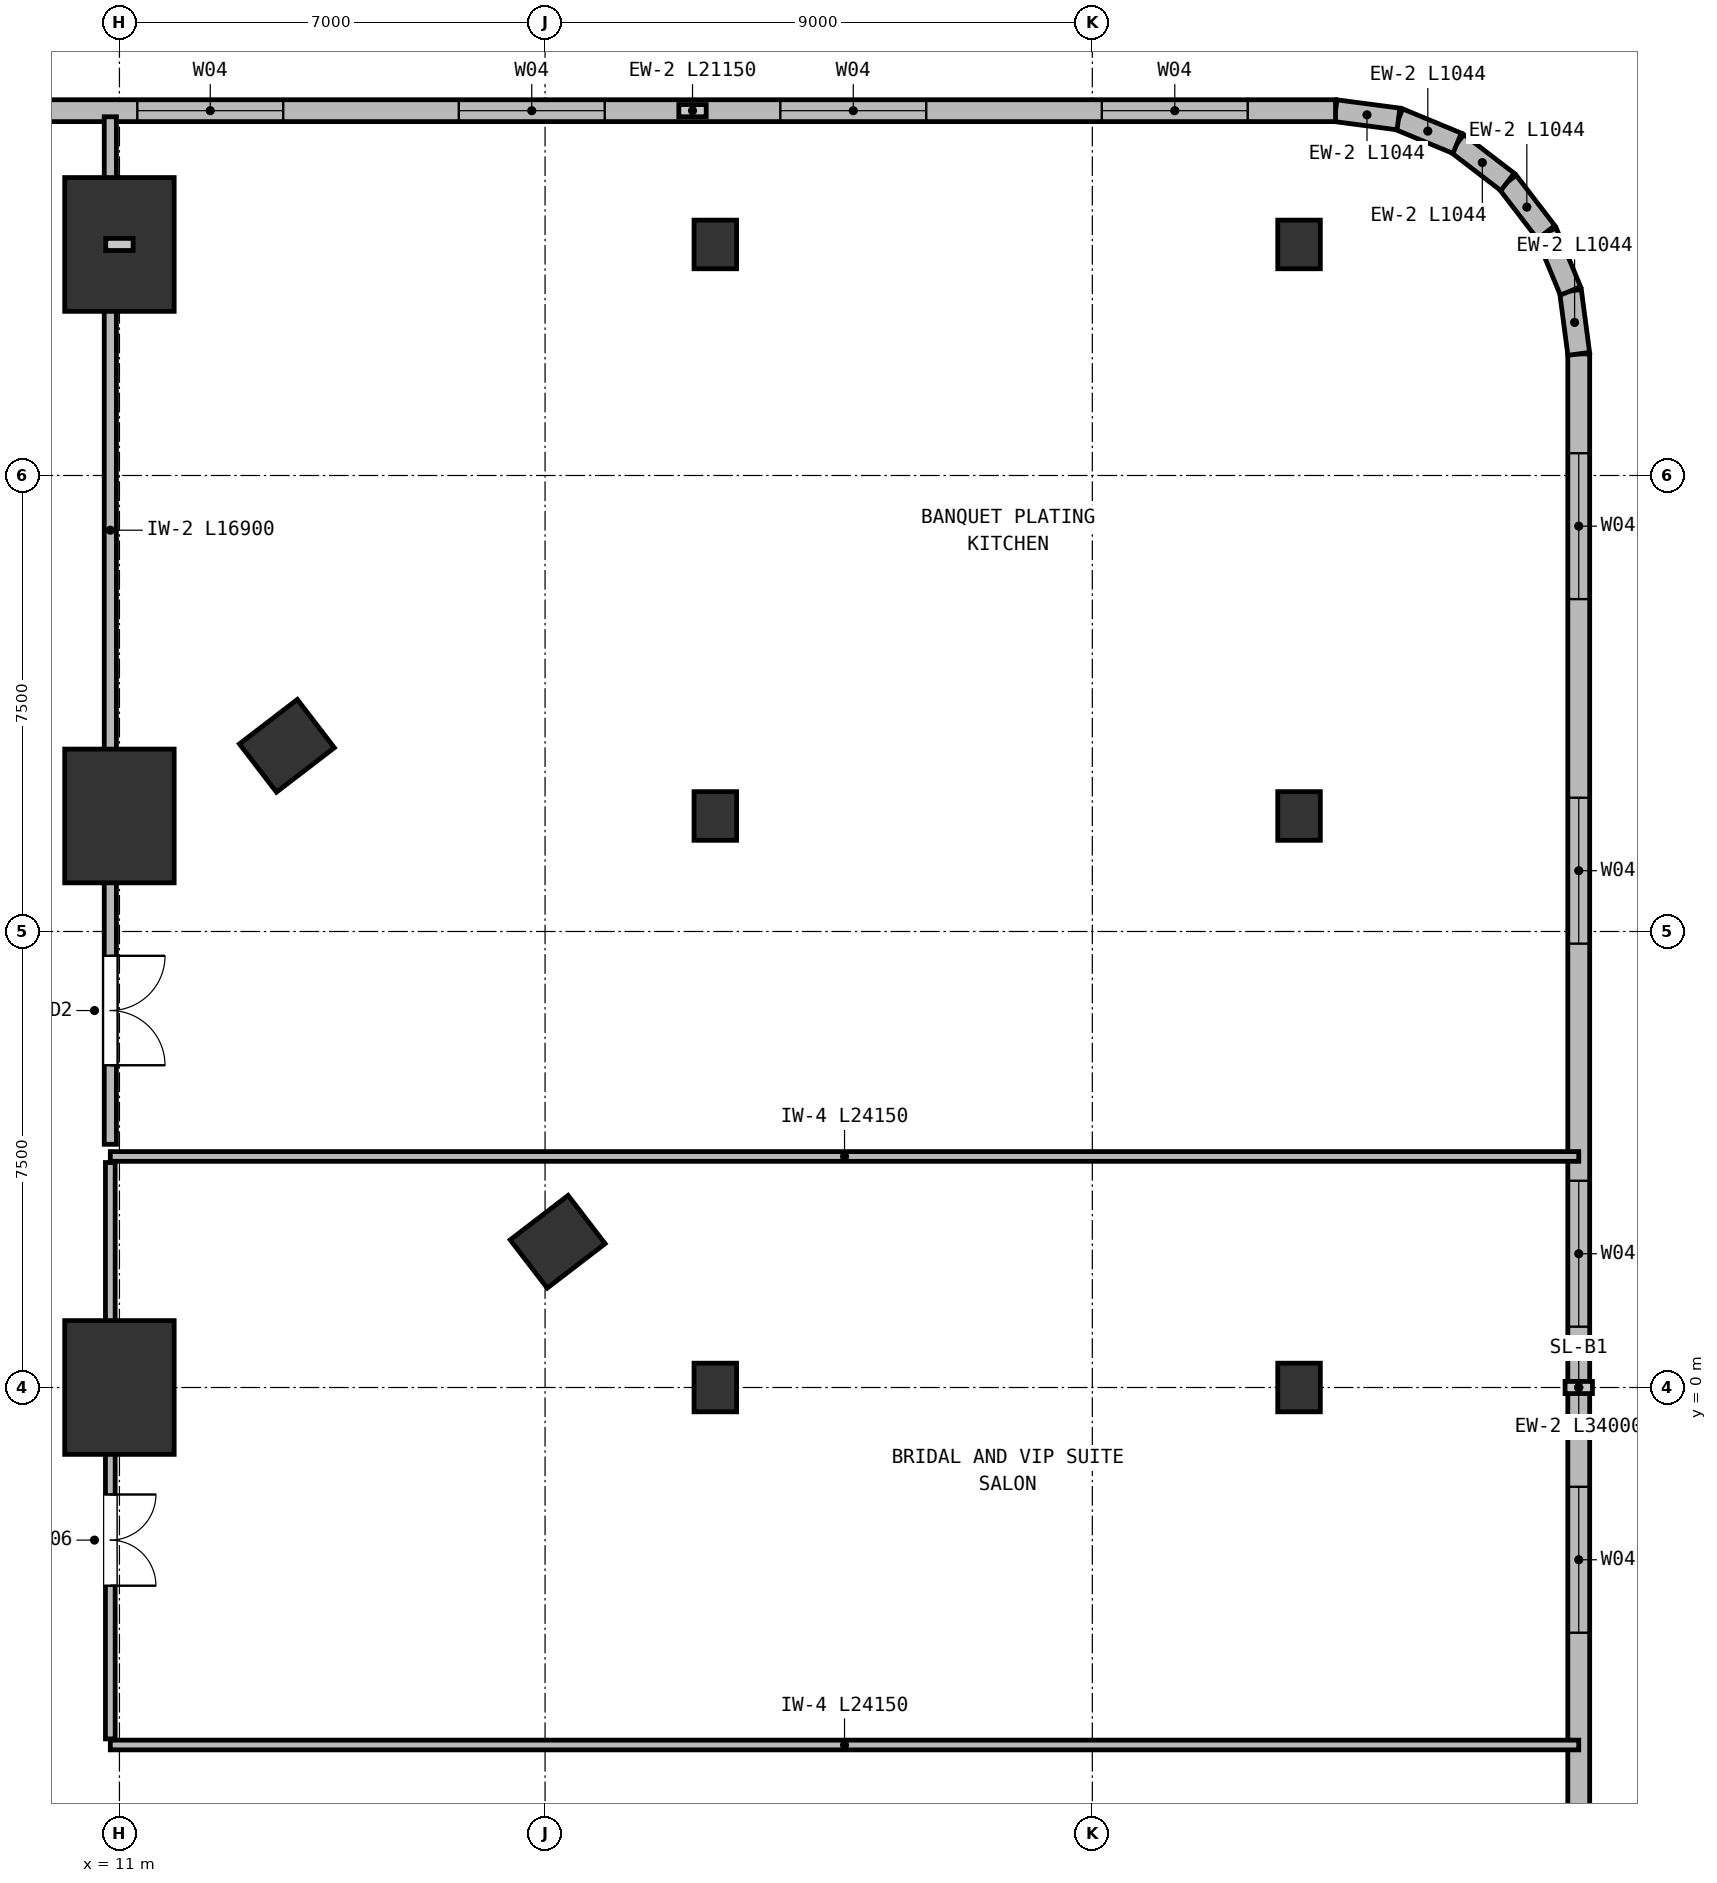
"""IFC4 building model, lengths in metres.
Left out: names, types, materials, properties, quantities, classifications, styles, units other than length and angle.
Written with IfcOpenShell. Run it as: python <this file> out.ifc"""

import sys

from ifc_helpers import new_model, si_unit, direction, frame, frame_2d, origin, origin_2d, place, context, subcontext, project, spatial, rectangle, extrude, element, fill, save


model = new_model("IFC4")
c1 = context("Model", 3, precision=1e-05, world=origin(), true_north=direction((0.0, 1.0)))
c2 = subcontext(c1, "Body", "Model", "MODEL_VIEW")
j1 = project(units=[si_unit("LENGTHUNIT", "METRE"), si_unit("PLANEANGLEUNIT", "RADIAN")], contexts=[c1])
p1 = place(None, origin())
s1 = spatial("IfcSite", under=j1, at=p1, CompositionType="ELEMENT")
p2 = place(p1, origin())
s2 = spatial("IfcBuilding", under=s1, at=p2, CompositionType="ELEMENT")
p3 = place(p2, frame((0.0, 0.0, 16.0)))
s3 = spatial("IfcBuildingStorey", under=s2, at=p3, CompositionType="ELEMENT", Elevation=16.0)
for number, where, z_axis, x_axis in (
    (1, (18.207, 2.397, 0.0), (0.0, 0.0, 1.0), (-0.609, 0.793, 0.0)),
    (2, (13.754, 10.554, 0.0), (0.0, 0.0, 1.0), (-0.609, 0.793, 0.0)),
):
    element("IfcColumn", number, at=place(p3, frame(where, z_axis=z_axis, x_axis=x_axis)), inside=s3, PredefinedType="COLUMN", context=c2, shape_type="SweptSolid", body=[
        extrude(rectangle(XDim=1.0, YDim=1.2, at=origin_2d()), origin(), (0.0, 0.0, 1.0), 5.5),
    ])
for number, where, z_axis, x_axis in (
    (3, (11.0, 0.0, 0.0), (0.0, 0.0, 1.0), (1.0, 0.0, 0.0)),
    (4, (11.0, 9.4, 0.0), (0.0, 0.0, 1.0), (1.0, 0.0, 0.0)),
    (5, (11.0, 18.8, 0.0), (0.0, 0.0, 1.0), (1.0, 0.0, 0.0)),
):
    element("IfcColumn", number, at=place(p3, frame(where, z_axis=z_axis, x_axis=x_axis)), inside=s3, PredefinedType="COLUMN", context=c2, shape_type="SweptSolid", body=[
        extrude(rectangle(XDim=1.8, YDim=2.2, at=origin_2d()), origin(), (0.0, 0.0, 1.0), 5.5),
    ])
for number, where, z_axis, x_axis in (
    (6, (20.8, 0.0, 0.0), (0.0, 0.0, 1.0), (1.0, 0.0, 0.0)),
    (7, (20.8, 9.4, 0.0), (0.0, 0.0, 1.0), (1.0, 0.0, 0.0)),
    (8, (20.8, 18.8, 0.0), (0.0, 0.0, 1.0), (1.0, 0.0, 0.0)),
    (9, (30.4, 0.0, 0.0), (0.0, 0.0, 1.0), (1.0, 0.0, 0.0)),
    (10, (30.4, 9.4, 0.0), (0.0, 0.0, 1.0), (1.0, 0.0, 0.0)),
    (11, (30.4, 18.8, 0.0), (0.0, 0.0, 1.0), (1.0, 0.0, 0.0)),
):
    element("IfcColumn", number, at=place(p3, frame(where, z_axis=z_axis, x_axis=x_axis)), inside=s3, PredefinedType="COLUMN", context=c2, shape_type="SweptSolid", body=[
        extrude(rectangle(XDim=0.7, YDim=0.8, at=origin_2d()), origin(), (0.0, 0.0, 1.0), 5.5),
    ])
p4 = place(p3, frame((35.0, 17.0, 0.0), z_axis=(0.0, 0.0, 1.0), x_axis=(0.0, -1.0, 0.0)))
e12 = element("IfcWall", 12, at=p4, inside=s3, PredefinedType="SOLIDWALL", context=c2, shape_type="SweptSolid", body=[
    extrude(rectangle(XDim=34.0, YDim=0.36, at=frame_2d((17.0, 0.0))), origin(), (0.0, 0.0, 1.0), 5.22),
])
p5 = place(p4, frame((1.633, 0.0, 0.95)))
e13 = element("IfcOpeningElement", 13, at=p5, cuts=e12, PredefinedType="OPENING", context=c2, shape_type="SweptSolid", body=[
    extrude(rectangle(XDim=2.4, YDim=2.6, at=frame_2d((1.2, 1.3))), frame((0.0, 0.19, 0.0), z_axis=(0.0, -1.0, 0.0), x_axis=(1.0, 0.0, 0.0)), (0.0, 0.0, 1.0), 0.38),
])
p6 = place(p4, frame((7.3, 0.0, 0.95)))
e14 = element("IfcOpeningElement", 14, at=p6, cuts=e12, PredefinedType="OPENING", context=c2, shape_type="SweptSolid", body=[
    extrude(rectangle(XDim=2.4, YDim=2.6, at=frame_2d((1.2, 1.3))), frame((0.0, 0.19, 0.0), z_axis=(0.0, -1.0, 0.0), x_axis=(1.0, 0.0, 0.0)), (0.0, 0.0, 1.0), 0.38),
])
p7 = place(p4, frame((13.6, 0.0, 0.95)))
e15 = element("IfcOpeningElement", 15, at=p7, cuts=e12, PredefinedType="OPENING", context=c2, shape_type="SweptSolid", body=[
    extrude(rectangle(XDim=2.4, YDim=2.6, at=frame_2d((1.2, 1.3))), frame((0.0, 0.19, 0.0), z_axis=(0.0, -1.0, 0.0), x_axis=(1.0, 0.0, 0.0)), (0.0, 0.0, 1.0), 0.38),
])
p8 = place(p4, frame((18.633, 0.0, 0.95)))
e16 = element("IfcOpeningElement", 16, at=p8, cuts=e12, PredefinedType="OPENING", context=c2, shape_type="SweptSolid", body=[
    extrude(rectangle(XDim=2.4, YDim=2.6, at=frame_2d((1.2, 1.3))), frame((0.0, 0.19, 0.0), z_axis=(0.0, -1.0, 0.0), x_axis=(1.0, 0.0, 0.0)), (0.0, 0.0, 1.0), 0.38),
])
p9 = place(p4, frame((24.3, 0.0, 0.95)))
e17 = element("IfcOpeningElement", 17, at=p9, cuts=e12, PredefinedType="OPENING", context=c2, shape_type="SweptSolid", body=[
    extrude(rectangle(XDim=2.4, YDim=2.6, at=frame_2d((1.2, 1.3))), frame((0.0, 0.19, 0.0), z_axis=(0.0, -1.0, 0.0), x_axis=(1.0, 0.0, 0.0)), (0.0, 0.0, 1.0), 0.38),
])
p10 = place(p4, frame((29.967, 0.0, 0.95)))
e18 = element("IfcOpeningElement", 18, at=p10, cuts=e12, PredefinedType="OPENING", context=c2, shape_type="SweptSolid", body=[
    extrude(rectangle(XDim=2.4, YDim=2.6, at=frame_2d((1.2, 1.3))), frame((0.0, 0.19, 0.0), z_axis=(0.0, -1.0, 0.0), x_axis=(1.0, 0.0, 0.0)), (0.0, 0.0, 1.0), 0.38),
])
p11 = place(p3, frame((34.864, 18.035, 0.0), z_axis=(0.0, 0.0, 1.0), x_axis=(0.130448465198, -0.991455091231, 0.0)))
e19 = element("IfcWall", 19, at=p11, inside=s3, PredefinedType="SOLIDWALL", context=c2, shape_type="SweptSolid", body=[
    extrude(rectangle(XDim=1.044, YDim=0.36, at=frame_2d((0.522, 0.0))), origin(), (0.0, 0.0, 1.0), 5.22),
])
for number, where, z_axis, x_axis in (
    (20, (34.464, 19.0, 0.0), (0.0, 0.0, 1.0), (0.383, -0.924, 0.0)),
    (21, (33.828, 19.828, 0.0), (0.0, 0.0, 1.0), (0.609, -0.793, 0.0)),
    (22, (33.0, 20.464, 0.0), (0.0, 0.0, 1.0), (0.793, -0.609, 0.0)),
    (23, (32.035, 20.864, 0.0), (0.0, 0.0, 1.0), (0.924, -0.383, 0.0)),
):
    element("IfcWall", number, at=place(p3, frame(where, z_axis=z_axis, x_axis=x_axis)), inside=s3, PredefinedType="SOLIDWALL", context=c2, shape_type="SweptSolid", body=[
        extrude(rectangle(XDim=1.044, YDim=0.36, at=frame_2d((0.522, 0.0))), origin(), (0.0, 0.0, 1.0), 5.22),
    ])
p12 = place(p3, frame((31.0, 21.0, 0.0), z_axis=(0.0, 0.0, 1.0), x_axis=(0.991455091231, -0.130448465198, 0.0)))
e24 = element("IfcWall", 24, at=p12, inside=s3, PredefinedType="SOLIDWALL", context=c2, shape_type="SweptSolid", body=[
    extrude(rectangle(XDim=1.044, YDim=0.36, at=frame_2d((0.522, 0.0))), origin(), (0.0, 0.0, 1.0), 5.22),
])
p13 = place(p3, frame((9.85, 21.0, 0.0), z_axis=(0.0, 0.0, 1.0), x_axis=(1.0, 0.0, 0.0)))
e25 = element("IfcWall", 25, at=p13, inside=s3, PredefinedType="SOLIDWALL", context=c2, shape_type="SweptSolid", body=[
    extrude(rectangle(XDim=21.15, YDim=0.36, at=frame_2d((10.575, 0.0))), origin(), (0.0, 0.0, 1.0), 5.22),
])
p14 = place(p13, frame((1.444, 0.0, 0.95)))
e26 = element("IfcOpeningElement", 26, at=p14, cuts=e25, PredefinedType="OPENING", context=c2, shape_type="SweptSolid", body=[
    extrude(rectangle(XDim=2.4, YDim=2.6, at=frame_2d((1.2, 1.3))), frame((0.0, 0.19, 0.0), z_axis=(0.0, -1.0, 0.0), x_axis=(1.0, 0.0, 0.0)), (0.0, 0.0, 1.0), 0.38),
])
p15 = place(p13, frame((6.731, 0.0, 0.95)))
e27 = element("IfcOpeningElement", 27, at=p15, cuts=e25, PredefinedType="OPENING", context=c2, shape_type="SweptSolid", body=[
    extrude(rectangle(XDim=2.4, YDim=2.6, at=frame_2d((1.2, 1.3))), frame((0.0, 0.19, 0.0), z_axis=(0.0, -1.0, 0.0), x_axis=(1.0, 0.0, 0.0)), (0.0, 0.0, 1.0), 0.38),
])
p16 = place(p13, frame((12.019, 0.0, 0.95)))
e28 = element("IfcOpeningElement", 28, at=p16, cuts=e25, PredefinedType="OPENING", context=c2, shape_type="SweptSolid", body=[
    extrude(rectangle(XDim=2.4, YDim=2.6, at=frame_2d((1.2, 1.3))), frame((0.0, 0.19, 0.0), z_axis=(0.0, -1.0, 0.0), x_axis=(1.0, 0.0, 0.0)), (0.0, 0.0, 1.0), 0.38),
])
p17 = place(p13, frame((17.306, 0.0, 0.95)))
e29 = element("IfcOpeningElement", 29, at=p17, cuts=e25, PredefinedType="OPENING", context=c2, shape_type="SweptSolid", body=[
    extrude(rectangle(XDim=2.4, YDim=2.6, at=frame_2d((1.2, 1.3))), frame((0.0, 0.19, 0.0), z_axis=(0.0, -1.0, 0.0), x_axis=(1.0, 0.0, 0.0)), (0.0, 0.0, 1.0), 0.38),
])
for number, where, z_axis, x_axis in (
    (30, (35.0, 3.8, 0.0), (0.0, 0.0, 1.0), (-1.0, 0.0, 0.0)),
    (31, (10.85, -5.88, 0.0), (0.0, 0.0, 1.0), (1.0, 0.0, 0.0)),
):
    element("IfcWall", number, at=place(p3, frame(where, z_axis=z_axis, x_axis=x_axis)), inside=s3, PredefinedType="PARTITIONING", context=c2, shape_type="SweptSolid", body=[
        extrude(rectangle(XDim=24.15, YDim=0.16, at=frame_2d((12.075, 0.0))), origin(), (0.0, 0.0, 1.0), 5.22),
    ])
p18 = place(p3, frame((10.85, 3.7, 0.0), z_axis=(0.0, 0.0, 1.0), x_axis=(0.0, -1.0, 0.0)))
e32 = element("IfcWall", 32, at=p18, inside=s3, PredefinedType="PARTITIONING", context=c2, shape_type="SweptSolid", body=[
    extrude(rectangle(XDim=9.48, YDim=0.16, at=frame_2d((4.74, 0.0))), origin(), (0.0, 0.0, 1.0), 4.6),
])
p19 = place(p18, frame((5.46, 0.0, 0.0)))
e33 = element("IfcOpeningElement", 33, at=p19, cuts=e32, PredefinedType="OPENING", context=c2, shape_type="SweptSolid", body=[
    extrude(rectangle(XDim=1.5, YDim=2.2, at=frame_2d((0.75, 1.1))), frame((0.0, 0.09, 0.0), z_axis=(0.0, -1.0, 0.0), x_axis=(1.0, 0.0, 0.0)), (0.0, 0.0, 1.0), 0.18),
])
p20 = place(p3, frame((10.85, 20.9, 0.0), z_axis=(0.0, 0.0, 1.0), x_axis=(0.0, -1.0, 0.0)))
e34 = element("IfcWall", 34, at=p20, inside=s3, PredefinedType="PARTITIONING", context=c2, shape_type="SweptSolid", body=[
    extrude(rectangle(XDim=16.9, YDim=0.2, at=frame_2d((8.45, 0.0))), origin(), (0.0, 0.0, 1.0), 4.6),
])
p21 = place(p20, frame((13.8, 0.0, 0.0)))
e35 = element("IfcOpeningElement", 35, at=p21, cuts=e34, PredefinedType="OPENING", context=c2, shape_type="SweptSolid", body=[
    extrude(rectangle(XDim=1.8, YDim=2.2, at=frame_2d((0.9, 1.1))), frame((0.0, 0.11, 0.0), z_axis=(0.0, -1.0, 0.0), x_axis=(1.0, 0.0, 0.0)), (0.0, 0.0, 1.0), 0.22),
])
p22 = place(p5, origin())
e36 = element("IfcWindow", 36, at=p22, inside=s3, PartitioningType="SINGLE_PANEL", PredefinedType="WINDOW", context=c2, shape_type="SweptSolid", body=[
    extrude(rectangle(XDim=2.4, YDim=2.6, at=frame_2d((1.2, 1.3))), frame((0.0, 0.03, 0.0), z_axis=(0.0, -1.0, 0.0), x_axis=(1.0, 0.0, 0.0)), (0.0, 0.0, 1.0), 0.06),
])
fill(e13, e36)
p23 = place(p6, origin())
e37 = element("IfcWindow", 37, at=p23, inside=s3, PartitioningType="SINGLE_PANEL", PredefinedType="WINDOW", context=c2, shape_type="SweptSolid", body=[
    extrude(rectangle(XDim=2.4, YDim=2.6, at=frame_2d((1.2, 1.3))), frame((0.0, 0.03, 0.0), z_axis=(0.0, -1.0, 0.0), x_axis=(1.0, 0.0, 0.0)), (0.0, 0.0, 1.0), 0.06),
])
fill(e14, e37)
p24 = place(p7, origin())
e38 = element("IfcWindow", 38, at=p24, inside=s3, PartitioningType="SINGLE_PANEL", PredefinedType="WINDOW", context=c2, shape_type="SweptSolid", body=[
    extrude(rectangle(XDim=2.4, YDim=2.6, at=frame_2d((1.2, 1.3))), frame((0.0, 0.03, 0.0), z_axis=(0.0, -1.0, 0.0), x_axis=(1.0, 0.0, 0.0)), (0.0, 0.0, 1.0), 0.06),
])
fill(e15, e38)
p25 = place(p8, origin())
e39 = element("IfcWindow", 39, at=p25, inside=s3, PartitioningType="SINGLE_PANEL", PredefinedType="WINDOW", context=c2, shape_type="SweptSolid", body=[
    extrude(rectangle(XDim=2.4, YDim=2.6, at=frame_2d((1.2, 1.3))), frame((0.0, 0.03, 0.0), z_axis=(0.0, -1.0, 0.0), x_axis=(1.0, 0.0, 0.0)), (0.0, 0.0, 1.0), 0.06),
])
fill(e16, e39)
p26 = place(p14, origin())
e40 = element("IfcWindow", 40, at=p26, inside=s3, PartitioningType="SINGLE_PANEL", PredefinedType="WINDOW", context=c2, shape_type="SweptSolid", body=[
    extrude(rectangle(XDim=2.4, YDim=2.6, at=frame_2d((1.2, 1.3))), frame((0.0, 0.03, 0.0), z_axis=(0.0, -1.0, 0.0), x_axis=(1.0, 0.0, 0.0)), (0.0, 0.0, 1.0), 0.06),
])
fill(e26, e40)
p27 = place(p15, origin())
e41 = element("IfcWindow", 41, at=p27, inside=s3, PartitioningType="SINGLE_PANEL", PredefinedType="WINDOW", context=c2, shape_type="SweptSolid", body=[
    extrude(rectangle(XDim=2.4, YDim=2.6, at=frame_2d((1.2, 1.3))), frame((0.0, 0.03, 0.0), z_axis=(0.0, -1.0, 0.0), x_axis=(1.0, 0.0, 0.0)), (0.0, 0.0, 1.0), 0.06),
])
fill(e27, e41)
p28 = place(p16, origin())
e42 = element("IfcWindow", 42, at=p28, inside=s3, PartitioningType="SINGLE_PANEL", PredefinedType="WINDOW", context=c2, shape_type="SweptSolid", body=[
    extrude(rectangle(XDim=2.4, YDim=2.6, at=frame_2d((1.2, 1.3))), frame((0.0, 0.03, 0.0), z_axis=(0.0, -1.0, 0.0), x_axis=(1.0, 0.0, 0.0)), (0.0, 0.0, 1.0), 0.06),
])
fill(e28, e42)
p29 = place(p17, origin())
e43 = element("IfcWindow", 43, at=p29, inside=s3, PartitioningType="SINGLE_PANEL", PredefinedType="WINDOW", context=c2, shape_type="SweptSolid", body=[
    extrude(rectangle(XDim=2.4, YDim=2.6, at=frame_2d((1.2, 1.3))), frame((0.0, 0.03, 0.0), z_axis=(0.0, -1.0, 0.0), x_axis=(1.0, 0.0, 0.0)), (0.0, 0.0, 1.0), 0.06),
])
fill(e29, e43)
p30 = place(p19, origin())
e44 = element("IfcDoor", 44, at=p30, inside=s3, OperationType="DOUBLE_DOOR_SINGLE_SWING", PredefinedType="DOOR", context=c2, shape_type="SweptSolid", body=[
    extrude(rectangle(XDim=1.5, YDim=2.2, at=frame_2d((0.75, 1.1))), frame((0.0, 0.025, 0.0), z_axis=(0.0, -1.0, 0.0), x_axis=(1.0, 0.0, 0.0)), (0.0, 0.0, 1.0), 0.05),
])
fill(e33, e44)
p31 = place(p21, origin())
e45 = element("IfcDoor", 45, at=p31, inside=s3, OperationType="DOUBLE_DOOR_SINGLE_SWING", PredefinedType="DOOR", context=c2, shape_type="SweptSolid", body=[
    extrude(rectangle(XDim=1.8, YDim=2.2, at=frame_2d((0.9, 1.1))), frame((0.0, 0.025, 0.0), z_axis=(0.0, -1.0, 0.0), x_axis=(1.0, 0.0, 0.0)), (0.0, 0.0, 1.0), 0.05),
])
fill(e35, e45)
save(model, sys.argv[1])
